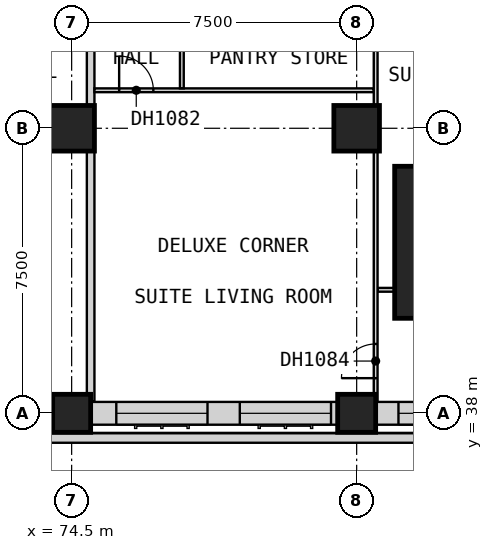
"""IFC4 building model, lengths in metres.
Left out: names, types, materials, properties, quantities, classifications, styles, units other than length and angle.
Written with IfcOpenShell. Run it as: python <this file> out.ifc"""

import sys

from ifc_helpers import new_model, si_unit, direction, frame, frame_2d, origin, origin_2d, place, context, subcontext, project, spatial, rectangle, extrude, element, fill, save


model = new_model("IFC4")
c1 = context("Model", 3, precision=1e-05, world=origin(), true_north=direction((0.0, 1.0)))
c2 = subcontext(c1, "Body", "Model", "MODEL_VIEW")
j1 = project(units=[si_unit("LENGTHUNIT", "METRE"), si_unit("PLANEANGLEUNIT", "RADIAN")], contexts=[c1])
p1 = place(None, origin())
s1 = spatial("IfcSite", under=j1, at=p1, CompositionType="ELEMENT")
p2 = place(p1, origin())
s2 = spatial("IfcBuilding", under=s1, at=p2, CompositionType="ELEMENT")
p3 = place(p2, frame((0.0, 0.0, 34.0)))
s3 = spatial("IfcBuildingStorey", under=s2, at=p3, CompositionType="ELEMENT", Elevation=34.0)
p4 = place(p3, frame((74.5, 38.0, 0.0), z_axis=(0.0, 0.0, 1.0), x_axis=(1.0, 0.0, 0.0)))
e1 = element("IfcColumn", 1, at=p4, inside=s3, PredefinedType="COLUMN", context=c2, shape_type="SweptSolid", body=[
    extrude(rectangle(XDim=1.0, YDim=1.0, at=origin_2d()), origin(), (0.0, 0.0, 1.0), 3.6),
])
p5 = place(p3, frame((74.5, 45.5, 0.0), z_axis=(0.0, 0.0, 1.0), x_axis=(1.0, 0.0, 0.0)))
e2 = element("IfcColumn", 2, at=p5, inside=s3, PredefinedType="COLUMN", context=c2, shape_type="SweptSolid", body=[
    extrude(rectangle(XDim=1.2, YDim=1.2, at=origin_2d()), origin(), (0.0, 0.0, 1.0), 3.6),
])
p6 = place(p3, frame((82.0, 38.0, 0.0), z_axis=(0.0, 0.0, 1.0), x_axis=(1.0, 0.0, 0.0)))
e3 = element("IfcColumn", 3, at=p6, inside=s3, PredefinedType="COLUMN", context=c2, shape_type="SweptSolid", body=[
    extrude(rectangle(XDim=1.0, YDim=1.0, at=origin_2d()), origin(), (0.0, 0.0, 1.0), 3.6),
])
p7 = place(p3, frame((82.0, 45.5, 0.0), z_axis=(0.0, 0.0, 1.0), x_axis=(1.0, 0.0, 0.0)))
e4 = element("IfcColumn", 4, at=p7, inside=s3, PredefinedType="COLUMN", context=c2, shape_type="SweptSolid", body=[
    extrude(rectangle(XDim=1.2, YDim=1.2, at=origin_2d()), origin(), (0.0, 0.0, 1.0), 3.6),
])
p8 = place(p3, frame((85.0, 42.5, 0.0), z_axis=(0.0, 0.0, 1.0), x_axis=(1.0, 0.0, 0.0)))
e5 = element("IfcColumn", 5, at=p8, inside=s3, PredefinedType="COLUMN", context=c2, shape_type="SweptSolid", body=[
    extrude(rectangle(XDim=4.0, YDim=4.0, at=origin_2d()), origin(), (0.0, 0.0, 1.0), 3.6),
])
p9 = place(p3, frame((75.0, 38.0, 0.0), z_axis=(0.0, 0.0, 1.0), x_axis=(1.0, 0.0, 0.0)))
e6 = element("IfcWall", 6, at=p9, inside=s3, PredefinedType="SOLIDWALL", context=c2, shape_type="SweptSolid", body=[
    extrude(rectangle(XDim=6.5, YDim=0.6, at=frame_2d((3.25, 0.0))), origin(), (0.0, 0.0, 1.0), 2.85),
])
p10 = place(p9, frame((0.675, 0.0, 0.8)))
e7 = element("IfcOpeningElement", 7, at=p10, cuts=e6, PredefinedType="OPENING", context=c2, shape_type="SweptSolid", body=[
    extrude(rectangle(XDim=2.4, YDim=1.8, at=frame_2d((1.2, 0.9))), frame((0.0, 0.31, 0.0), z_axis=(0.0, -1.0, 0.0), x_axis=(1.0, 0.0, 0.0)), (0.0, 0.0, 1.0), 0.62),
])
p11 = place(p9, frame((3.925, 0.0, 0.8)))
e8 = element("IfcOpeningElement", 8, at=p11, cuts=e6, PredefinedType="OPENING", context=c2, shape_type="SweptSolid", body=[
    extrude(rectangle(XDim=2.4, YDim=1.8, at=frame_2d((1.2, 0.9))), frame((0.0, 0.31, 0.0), z_axis=(0.0, -1.0, 0.0), x_axis=(1.0, 0.0, 0.0)), (0.0, 0.0, 1.0), 0.62),
])
p12 = place(p3, frame((82.5, 38.0, 0.0), z_axis=(0.0, 0.0, 1.0), x_axis=(1.0, 0.0, 0.0)))
e9 = element("IfcWall", 9, at=p12, inside=s3, PredefinedType="SOLIDWALL", context=c2, shape_type="SweptSolid", body=[
    extrude(rectangle(XDim=4.5, YDim=0.6, at=frame_2d((2.25, 0.0))), origin(), (0.0, 0.0, 1.0), 3.35),
])
p13 = place(p12, frame((0.6, 0.0, 0.8)))
e10 = element("IfcOpeningElement", 10, at=p13, cuts=e9, PredefinedType="OPENING", context=c2, shape_type="SweptSolid", body=[
    extrude(rectangle(XDim=2.4, YDim=1.8, at=frame_2d((1.2, 0.9))), frame((0.0, 0.31, 0.0), z_axis=(0.0, -1.0, 0.0), x_axis=(1.0, 0.0, 0.0)), (0.0, 0.0, 1.0), 0.62),
])
p14 = place(p3, frame((75.0, 38.31, 0.0), z_axis=(0.0, 0.0, 1.0), x_axis=(0.0, 1.0, 0.0)))
e11 = element("IfcWall", 11, at=p14, inside=s3, PredefinedType="PARTITIONING", context=c2, shape_type="SweptSolid", body=[
    extrude(rectangle(XDim=11.715, YDim=0.2, at=frame_2d((5.857, 0.0))), origin(), (0.0, 0.0, 1.0), 3.35),
])
p15 = place(p3, frame((82.55, 41.25, 0.0), z_axis=(0.0, 0.0, 1.0), x_axis=(1.0, 0.0, 0.0)))
e12 = element("IfcWall", 12, at=p15, inside=s3, PredefinedType="PARTITIONING", context=c2, shape_type="SweptSolid", body=[
    extrude(rectangle(XDim=4.44, YDim=0.1, at=frame_2d((2.22, 0.0))), origin(), (0.0, 0.0, 1.0), 3.35),
])
p16 = place(p3, frame((72.062, 45.75, 0.0), z_axis=(0.0, 0.0, 1.0), x_axis=(1.0, 0.0, 0.0)))
e13 = element("IfcWall", 13, at=p16, inside=s3, PredefinedType="PARTITIONING", context=c2, shape_type="SweptSolid", body=[
    extrude(rectangle(XDim=2.837, YDim=0.1, at=frame_2d((1.419, 0.0))), origin(), (0.0, 0.0, 1.0), 3.35),
])
p17 = place(p16, frame((0.887, 0.0, 0.0)))
e14 = element("IfcOpeningElement", 14, at=p17, cuts=e13, PredefinedType="OPENING", context=c2, shape_type="SweptSolid", body=[
    extrude(rectangle(XDim=0.9, YDim=2.1, at=frame_2d((0.45, 1.05))), frame((0.0, 0.06, 0.0), z_axis=(0.0, -1.0, 0.0), x_axis=(1.0, 0.0, 0.0)), (0.0, 0.0, 1.0), 0.12),
])
p18 = place(p3, frame((75.1, 46.5, 0.0), z_axis=(0.0, 0.0, 1.0), x_axis=(1.0, 0.0, 0.0)))
e15 = element("IfcWall", 15, at=p18, inside=s3, PredefinedType="PARTITIONING", context=c2, shape_type="SweptSolid", body=[
    extrude(rectangle(XDim=7.35, YDim=0.1, at=frame_2d((3.675, 0.0))), origin(), (0.0, 0.0, 1.0), 3.35),
])
p19 = place(p18, frame((0.65, 0.0, 0.0)))
e16 = element("IfcOpeningElement", 16, at=p19, cuts=e15, PredefinedType="OPENING", context=c2, shape_type="SweptSolid", body=[
    extrude(rectangle(XDim=0.9, YDim=2.1, at=frame_2d((0.45, 1.05))), frame((0.0, 0.06, 0.0), z_axis=(0.0, -1.0, 0.0), x_axis=(1.0, 0.0, 0.0)), (0.0, 0.0, 1.0), 0.12),
])
p20 = place(p3, frame((77.4, 46.55, 0.0), z_axis=(0.0, 0.0, 1.0), x_axis=(0.0, 1.0, 0.0)))
e17 = element("IfcWall", 17, at=p20, inside=s3, PredefinedType="PARTITIONING", context=c2, shape_type="SweptSolid", body=[
    extrude(rectangle(XDim=3.475, YDim=0.1, at=frame_2d((1.737, 0.0))), origin(), (0.0, 0.0, 1.0), 3.35),
])
p21 = place(p20, frame((1.3, 0.0, 0.0)))
e18 = element("IfcOpeningElement", 18, at=p21, cuts=e17, PredefinedType="OPENING", context=c2, shape_type="SweptSolid", body=[
    extrude(rectangle(XDim=0.9, YDim=2.1, at=frame_2d((0.45, 1.05))), frame((0.0, 0.06, 0.0), z_axis=(0.0, -1.0, 0.0), x_axis=(1.0, 0.0, 0.0)), (0.0, 0.0, 1.0), 0.12),
])
p22 = place(p3, frame((82.5, 38.31, 0.0), z_axis=(0.0, 0.0, 1.0), x_axis=(0.0, 1.0, 0.0)))
e19 = element("IfcWall", 19, at=p22, inside=s3, PredefinedType="PARTITIONING", context=c2, shape_type="SweptSolid", body=[
    extrude(rectangle(XDim=11.728, YDim=0.1, at=frame_2d((5.864, 0.0))), origin(), (0.0, 0.0, 1.0), 3.35),
])
p23 = place(p22, frame((0.615, 0.0, 0.0)))
e20 = element("IfcOpeningElement", 20, at=p23, cuts=e19, PredefinedType="OPENING", context=c2, shape_type="SweptSolid", body=[
    extrude(rectangle(XDim=0.9, YDim=2.1, at=frame_2d((0.45, 1.05))), frame((0.0, 0.06, 0.0), z_axis=(0.0, -1.0, 0.0), x_axis=(1.0, 0.0, 0.0)), (0.0, 0.0, 1.0), 0.12),
])
p24 = place(p22, frame((9.54, 0.0, 0.0)))
e21 = element("IfcOpeningElement", 21, at=p24, cuts=e19, PredefinedType="OPENING", context=c2, shape_type="SweptSolid", body=[
    extrude(rectangle(XDim=0.9, YDim=2.1, at=frame_2d((0.45, 1.05))), frame((0.0, 0.06, 0.0), z_axis=(0.0, -1.0, 0.0), x_axis=(1.0, 0.0, 0.0)), (0.0, 0.0, 1.0), 0.12),
])
p25 = place(p3, frame((23.125, 37.35, 0.0), z_axis=(0.0, 0.0, 1.0), x_axis=(1.0, 0.0, 0.0)))
e22 = element("IfcWall", 22, at=p25, inside=s3, PredefinedType="PARAPET", context=c2, shape_type="SweptSolid", body=[
    extrude(rectangle(XDim=66.25, YDim=0.25, at=frame_2d((33.125, 0.0))), origin(), (0.0, 0.0, 1.0), 1.2),
])
p26 = place(p10, origin())
e23 = element("IfcWindow", 23, at=p26, inside=s3, PartitioningType="SINGLE_PANEL", PredefinedType="WINDOW", context=c2, shape_type="SweptSolid", body=[
    extrude(rectangle(XDim=2.4, YDim=1.8, at=frame_2d((1.2, 0.9))), frame((0.0, -0.07, 0.0), z_axis=(0.0, -1.0, 0.0), x_axis=(1.0, 0.0, 0.0)), (0.0, 0.0, 1.0), 0.06),
])
fill(e7, e23)
p27 = place(p11, origin())
e24 = element("IfcWindow", 24, at=p27, inside=s3, PartitioningType="SINGLE_PANEL", PredefinedType="WINDOW", context=c2, shape_type="SweptSolid", body=[
    extrude(rectangle(XDim=2.4, YDim=1.8, at=frame_2d((1.2, 0.9))), frame((0.0, -0.07, 0.0), z_axis=(0.0, -1.0, 0.0), x_axis=(1.0, 0.0, 0.0)), (0.0, 0.0, 1.0), 0.06),
])
fill(e8, e24)
p28 = place(p13, origin())
e25 = element("IfcWindow", 25, at=p28, inside=s3, PartitioningType="SINGLE_PANEL", PredefinedType="WINDOW", context=c2, shape_type="SweptSolid", body=[
    extrude(rectangle(XDim=2.4, YDim=1.8, at=frame_2d((1.2, 0.9))), frame((0.0, -0.07, 0.0), z_axis=(0.0, -1.0, 0.0), x_axis=(1.0, 0.0, 0.0)), (0.0, 0.0, 1.0), 0.06),
])
fill(e10, e25)
p29 = place(p19, origin())
e26 = element("IfcDoor", 26, at=p29, inside=s3, OperationType="SINGLE_SWING_RIGHT", PredefinedType="DOOR", context=c2, shape_type="SweptSolid", body=[
    extrude(rectangle(XDim=0.9, YDim=2.1, at=frame_2d((0.45, 1.05))), frame((0.0, 0.025, 0.0), z_axis=(0.0, -1.0, 0.0), x_axis=(1.0, 0.0, 0.0)), (0.0, 0.0, 1.0), 0.05),
])
fill(e16, e26)
p30 = place(p23, origin())
e27 = element("IfcDoor", 27, at=p30, inside=s3, OperationType="SINGLE_SWING_LEFT", PredefinedType="DOOR", context=c2, shape_type="SweptSolid", body=[
    extrude(rectangle(XDim=0.9, YDim=2.1, at=frame_2d((0.45, 1.05))), frame((0.0, 0.025, 0.0), z_axis=(0.0, -1.0, 0.0), x_axis=(1.0, 0.0, 0.0)), (0.0, 0.0, 1.0), 0.05),
])
fill(e20, e27)
save(model, sys.argv[1])
